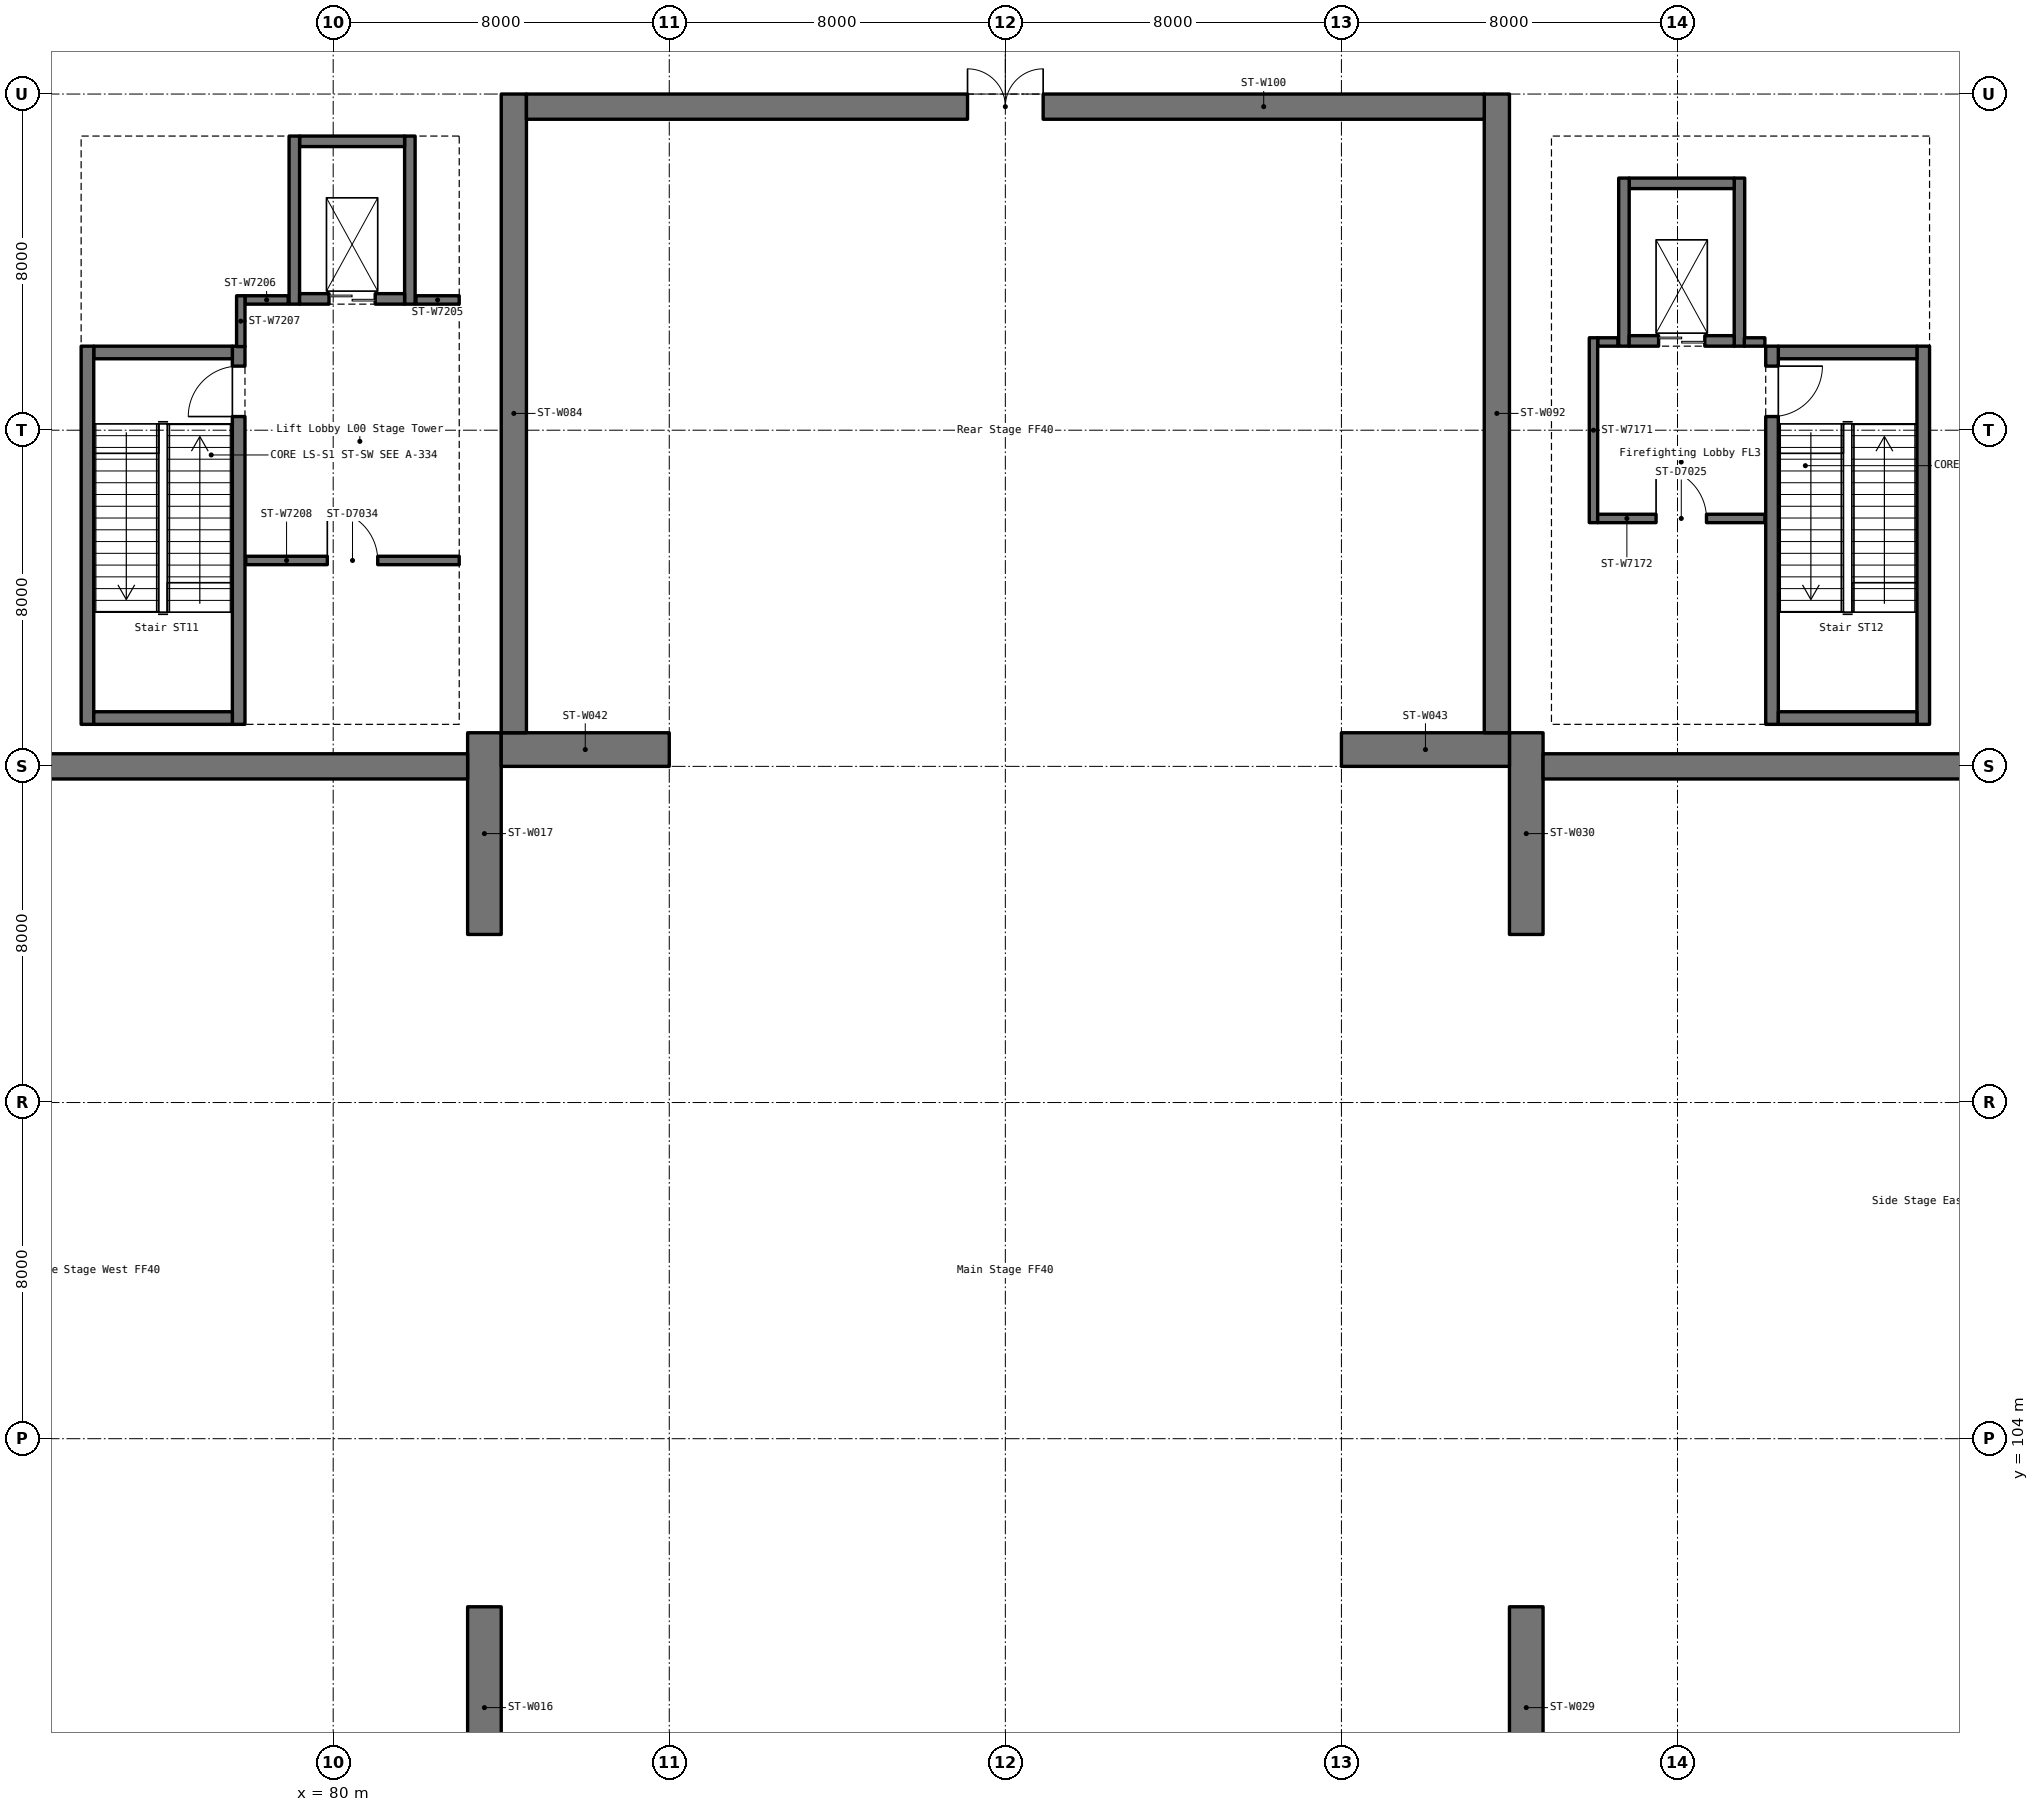
"""IFC4 building model, lengths in metres.
Left out: names, types, materials, properties, quantities, classifications, styles, units other than length and angle.
Written with IfcOpenShell. Run it as: python <this file> out.ifc"""

import sys

from ifc_helpers import new_model, si_unit, direction, frame, frame_2d, origin, place, context, subcontext, project, spatial, rectangle, extrude, element, fill, save


model = new_model("IFC4")
c1 = context("Model", 3, precision=1e-05, world=origin(), true_north=direction((0.0, 1.0)))
c2 = subcontext(c1, "Body", "Model", "MODEL_VIEW")
j1 = project(units=[si_unit("LENGTHUNIT", "METRE"), si_unit("PLANEANGLEUNIT", "RADIAN")], contexts=[c1])
p1 = place(None, origin())
s1 = spatial("IfcSite", under=j1, at=p1, CompositionType="ELEMENT")
p2 = place(p1, origin())
s2 = spatial("IfcBuilding", under=s1, at=p2, CompositionType="ELEMENT")
p3 = place(p2, origin())
s3 = spatial("IfcBuildingStorey", under=s2, at=p3, CompositionType="ELEMENT", Elevation=0.0)
for number, where, z_axis, x_axis in (
    (1, (83.6, 95.2, 0.0), (0.0, 0.0, 1.0), (0.0, 1.0, 0.0)),
    (2, (83.6, 116.0, 0.0), (0.0, 0.0, 1.0), (0.0, 1.0, 0.0)),
    (3, (108.4, 95.2, 0.0), (0.0, 0.0, 1.0), (0.0, 1.0, 0.0)),
    (4, (108.4, 116.0, 0.0), (0.0, 0.0, 1.0), (0.0, 1.0, 0.0)),
):
    element("IfcWall", number, at=place(p3, frame(where, z_axis=z_axis, x_axis=x_axis)), inside=s3, PredefinedType="SHEAR", context=c2, shape_type="SweptSolid", body=[
        extrude(rectangle(XDim=4.8, YDim=0.8, at=frame_2d((2.4, 0.0))), origin(), (0.0, 0.0, 1.0), 6.0),
    ])
for number, where, z_axis, x_axis in (
    (5, (84.0, 120.4, 0.0), (0.0, 0.0, 1.0), (1.0, 0.0, 0.0)),
    (6, (104.0, 120.4, 0.0), (0.0, 0.0, 1.0), (1.0, 0.0, 0.0)),
):
    element("IfcWall", number, at=place(p3, frame(where, z_axis=z_axis, x_axis=x_axis)), inside=s3, PredefinedType="SHEAR", context=c2, shape_type="SweptSolid", body=[
        extrude(rectangle(XDim=4.0, YDim=0.8, at=frame_2d((2.0, 0.0))), origin(), (0.0, 0.0, 1.0), 6.0),
    ])
for number, where, z_axis, x_axis in (
    (7, (60.6, 120.0, 0.0), (0.0, 0.0, 1.0), (1.0, 0.0, 0.0)),
    (8, (108.8, 120.0, 0.0), (0.0, 0.0, 1.0), (1.0, 0.0, 0.0)),
):
    element("IfcWall", number, at=place(p3, frame(where, z_axis=z_axis, x_axis=x_axis)), inside=s3, PredefinedType="SHEAR", context=c2, shape_type="SweptSolid", body=[
        extrude(rectangle(XDim=22.6, YDim=0.6, at=frame_2d((11.3, 0.0))), origin(), (0.0, 0.0, 1.0), 6.0),
    ])
for number, where, z_axis, x_axis in (
    (9, (84.3, 120.8, 0.0), (0.0, 0.0, 1.0), (0.0, 1.0, 0.0)),
    (10, (107.7, 120.8, 0.0), (0.0, 0.0, 1.0), (0.0, 1.0, 0.0)),
):
    element("IfcWall", number, at=place(p3, frame(where, z_axis=z_axis, x_axis=x_axis)), inside=s3, PredefinedType="SHEAR", context=c2, shape_type="SweptSolid", body=[
        extrude(rectangle(XDim=15.2, YDim=0.6, at=frame_2d((7.6, 0.0))), origin(), (0.0, 0.0, 1.0), 6.0),
    ])
p4 = place(p3, frame((84.6, 135.7, 0.0), z_axis=(0.0, 0.0, 1.0), x_axis=(1.0, 0.0, 0.0)))
e11 = element("IfcWall", 11, at=p4, inside=s3, PredefinedType="SHEAR", context=c2, shape_type="SweptSolid", body=[
    extrude(rectangle(XDim=22.8, YDim=0.6, at=frame_2d((11.4, 0.0))), origin(), (0.0, 0.0, 1.0), 6.0),
])
p5 = place(p4, frame((10.5, 0.0, 0.0)))
e12 = element("IfcOpeningElement", 12, at=p5, cuts=e11, PredefinedType="OPENING", context=c2, shape_type="SweptSolid", body=[
    extrude(rectangle(XDim=1.8, YDim=2.1, at=frame_2d((0.9, 1.05))), frame((0.0, 0.312, 0.0), z_axis=(0.0, -1.0, 0.0), x_axis=(1.0, 0.0, 0.0)), (0.0, 0.0, 1.0), 0.624),
])
p6 = place(p3, frame((77.75, 121.0, 0.0), z_axis=(0.0, 0.0, 1.0), x_axis=(0.0, 1.0, 0.0)))
e13 = element("IfcWall", 13, at=p6, inside=s3, PredefinedType="SOLIDWALL", context=c2, shape_type="SweptSolid", body=[
    extrude(rectangle(XDim=9.0, YDim=0.3, at=frame_2d((4.5, 0.0))), origin(), (0.0, 0.0, 1.0), 6.0),
])
p7 = place(p6, frame((7.325, 0.0, 0.0)))
e14 = element("IfcOpeningElement", 14, at=p7, cuts=e13, PredefinedType="OPENING", context=c2, shape_type="SweptSolid", body=[
    extrude(rectangle(XDim=1.2, YDim=2.1, at=frame_2d((0.6, 1.05))), frame((0.0, 0.162, 0.0), z_axis=(0.0, -1.0, 0.0), x_axis=(1.0, 0.0, 0.0)), (0.0, 0.0, 1.0), 0.324),
])
p8 = place(p3, frame((77.6, 129.85, 0.0), z_axis=(0.0, 0.0, 1.0), x_axis=(-1.0, 0.0, 0.0)))
e15 = element("IfcWall", 15, at=p8, inside=s3, PredefinedType="SOLIDWALL", context=c2, shape_type="SweptSolid", body=[
    extrude(rectangle(XDim=3.3, YDim=0.3, at=frame_2d((1.65, 0.0))), origin(), (0.0, 0.0, 1.0), 6.0),
])
p9 = place(p3, frame((74.15, 130.0, 0.0), z_axis=(0.0, 0.0, 1.0), x_axis=(0.0, -1.0, 0.0)))
e16 = element("IfcWall", 16, at=p9, inside=s3, PredefinedType="SOLIDWALL", context=c2, shape_type="SweptSolid", body=[
    extrude(rectangle(XDim=9.0, YDim=0.3, at=frame_2d((4.5, 0.0))), origin(), (0.0, 0.0, 1.0), 6.0),
])
p10 = place(p3, frame((74.3, 121.15, 0.0), z_axis=(0.0, 0.0, 1.0), x_axis=(1.0, 0.0, 0.0)))
e17 = element("IfcWall", 17, at=p10, inside=s3, PredefinedType="SOLIDWALL", context=c2, shape_type="SweptSolid", body=[
    extrude(rectangle(XDim=3.3, YDim=0.3, at=frame_2d((1.65, 0.0))), origin(), (0.0, 0.0, 1.0), 6.0),
])
p11 = place(p3, frame((117.85, 121.0, 0.0), z_axis=(0.0, 0.0, 1.0), x_axis=(0.0, 1.0, 0.0)))
e18 = element("IfcWall", 18, at=p11, inside=s3, PredefinedType="SOLIDWALL", context=c2, shape_type="SweptSolid", body=[
    extrude(rectangle(XDim=9.0, YDim=0.3, at=frame_2d((4.5, 0.0))), origin(), (0.0, 0.0, 1.0), 6.0),
])
p12 = place(p3, frame((117.7, 129.85, 0.0), z_axis=(0.0, 0.0, 1.0), x_axis=(-1.0, 0.0, 0.0)))
e19 = element("IfcWall", 19, at=p12, inside=s3, PredefinedType="SOLIDWALL", context=c2, shape_type="SweptSolid", body=[
    extrude(rectangle(XDim=3.3, YDim=0.3, at=frame_2d((1.65, 0.0))), origin(), (0.0, 0.0, 1.0), 6.0),
])
p13 = place(p3, frame((114.25, 130.0, 0.0), z_axis=(0.0, 0.0, 1.0), x_axis=(0.0, -1.0, 0.0)))
e20 = element("IfcWall", 20, at=p13, inside=s3, PredefinedType="SOLIDWALL", context=c2, shape_type="SweptSolid", body=[
    extrude(rectangle(XDim=9.0, YDim=0.3, at=frame_2d((4.5, 0.0))), origin(), (0.0, 0.0, 1.0), 6.0),
])
p14 = place(p13, frame((0.475, 0.0, 0.0)))
e21 = element("IfcOpeningElement", 21, at=p14, cuts=e20, PredefinedType="OPENING", context=c2, shape_type="SweptSolid", body=[
    extrude(rectangle(XDim=1.2, YDim=2.1, at=frame_2d((0.6, 1.05))), frame((0.0, 0.162, 0.0), z_axis=(0.0, -1.0, 0.0), x_axis=(1.0, 0.0, 0.0)), (0.0, 0.0, 1.0), 0.324),
])
p15 = place(p3, frame((114.4, 121.15, 0.0), z_axis=(0.0, 0.0, 1.0), x_axis=(1.0, 0.0, 0.0)))
e22 = element("IfcWall", 22, at=p15, inside=s3, PredefinedType="SOLIDWALL", context=c2, shape_type="SweptSolid", body=[
    extrude(rectangle(XDim=3.3, YDim=0.3, at=frame_2d((1.65, 0.0))), origin(), (0.0, 0.0, 1.0), 6.0),
])
p16 = place(p3, frame((113.475, 130.0, 0.0), z_axis=(0.0, 0.0, 1.0), x_axis=(0.0, 1.0, 0.0)))
e23 = element("IfcWall", 23, at=p16, inside=s3, PredefinedType="SOLIDWALL", context=c2, shape_type="SweptSolid", body=[
    extrude(rectangle(XDim=4.0, YDim=0.25, at=frame_2d((2.0, 0.0))), origin(), (0.0, 0.0, 1.0), 6.0),
])
p17 = place(p3, frame((113.35, 133.875, 0.0), z_axis=(0.0, 0.0, 1.0), x_axis=(-1.0, 0.0, 0.0)))
e24 = element("IfcWall", 24, at=p17, inside=s3, PredefinedType="SOLIDWALL", context=c2, shape_type="SweptSolid", body=[
    extrude(rectangle(XDim=2.5, YDim=0.25, at=frame_2d((1.25, 0.0))), origin(), (0.0, 0.0, 1.0), 6.0),
])
p18 = place(p3, frame((110.725, 134.0, 0.0), z_axis=(0.0, 0.0, 1.0), x_axis=(0.0, -1.0, 0.0)))
e25 = element("IfcWall", 25, at=p18, inside=s3, PredefinedType="SOLIDWALL", context=c2, shape_type="SweptSolid", body=[
    extrude(rectangle(XDim=4.0, YDim=0.25, at=frame_2d((2.0, 0.0))), origin(), (0.0, 0.0, 1.0), 6.0),
])
p19 = place(p3, frame((110.85, 130.125, 0.0), z_axis=(0.0, 0.0, 1.0), x_axis=(1.0, 0.0, 0.0)))
e26 = element("IfcWall", 26, at=p19, inside=s3, PredefinedType="SOLIDWALL", context=c2, shape_type="SweptSolid", body=[
    extrude(rectangle(XDim=2.5, YDim=0.25, at=frame_2d((1.25, 0.0))), origin(), (0.0, 0.0, 1.0), 6.0),
])
p20 = place(p19, frame((0.7, 0.0, 0.0)))
e27 = element("IfcOpeningElement", 27, at=p20, cuts=e26, PredefinedType="OPENING", context=c2, shape_type="SweptSolid", body=[
    extrude(rectangle(XDim=1.1, YDim=2.1, at=frame_2d((0.55, 1.05))), frame((0.0, 0.137, 0.0), z_axis=(0.0, -1.0, 0.0), x_axis=(1.0, 0.0, 0.0)), (0.0, 0.0, 1.0), 0.274),
])
p21 = place(p3, frame((81.825, 131.0, 0.0), z_axis=(0.0, 0.0, 1.0), x_axis=(0.0, 1.0, 0.0)))
e28 = element("IfcWall", 28, at=p21, inside=s3, PredefinedType="SOLIDWALL", context=c2, shape_type="SweptSolid", body=[
    extrude(rectangle(XDim=4.0, YDim=0.25, at=frame_2d((2.0, 0.0))), origin(), (0.0, 0.0, 1.0), 6.0),
])
p22 = place(p3, frame((81.7, 134.875, 0.0), z_axis=(0.0, 0.0, 1.0), x_axis=(-1.0, 0.0, 0.0)))
e29 = element("IfcWall", 29, at=p22, inside=s3, PredefinedType="SOLIDWALL", context=c2, shape_type="SweptSolid", body=[
    extrude(rectangle(XDim=2.5, YDim=0.25, at=frame_2d((1.25, 0.0))), origin(), (0.0, 0.0, 1.0), 6.0),
])
p23 = place(p3, frame((79.075, 135.0, 0.0), z_axis=(0.0, 0.0, 1.0), x_axis=(0.0, -1.0, 0.0)))
e30 = element("IfcWall", 30, at=p23, inside=s3, PredefinedType="SOLIDWALL", context=c2, shape_type="SweptSolid", body=[
    extrude(rectangle(XDim=4.0, YDim=0.25, at=frame_2d((2.0, 0.0))), origin(), (0.0, 0.0, 1.0), 6.0),
])
p24 = place(p3, frame((79.2, 131.125, 0.0), z_axis=(0.0, 0.0, 1.0), x_axis=(1.0, 0.0, 0.0)))
e31 = element("IfcWall", 31, at=p24, inside=s3, PredefinedType="SOLIDWALL", context=c2, shape_type="SweptSolid", body=[
    extrude(rectangle(XDim=2.5, YDim=0.25, at=frame_2d((1.25, 0.0))), origin(), (0.0, 0.0, 1.0), 6.0),
])
p25 = place(p24, frame((0.7, 0.0, 0.0)))
e32 = element("IfcOpeningElement", 32, at=p25, cuts=e31, PredefinedType="OPENING", context=c2, shape_type="SweptSolid", body=[
    extrude(rectangle(XDim=1.1, YDim=2.1, at=frame_2d((0.55, 1.05))), frame((0.0, 0.137, 0.0), z_axis=(0.0, -1.0, 0.0), x_axis=(1.0, 0.0, 0.0)), (0.0, 0.0, 1.0), 0.274),
])
p26 = place(p3, frame((114.08, 130.1, 0.0), z_axis=(0.0, 0.0, 1.0), x_axis=(-1.0, 0.0, 0.0)))
e33 = element("IfcWall", 33, at=p26, inside=s3, PredefinedType="PARTITIONING", context=c2, shape_type="SweptSolid", body=[
    extrude(rectangle(XDim=0.49, YDim=0.2, at=frame_2d((0.245, 0.0))), origin(), (0.0, 0.0, 1.0), 5.78),
])
p27 = place(p3, frame((110.58, 130.1, 0.0), z_axis=(0.0, 0.0, 1.0), x_axis=(-1.0, 0.0, 0.0)))
e34 = element("IfcWall", 34, at=p27, inside=s3, PredefinedType="PARTITIONING", context=c2, shape_type="SweptSolid", body=[
    extrude(rectangle(XDim=0.48, YDim=0.2, at=frame_2d((0.24, 0.0))), origin(), (0.0, 0.0, 1.0), 5.78),
])
p28 = place(p3, frame((110.0, 130.2, 0.0), z_axis=(0.0, 0.0, 1.0), x_axis=(0.0, -1.0, 0.0)))
e35 = element("IfcWall", 35, at=p28, inside=s3, PredefinedType="PARTITIONING", context=c2, shape_type="SweptSolid", body=[
    extrude(rectangle(XDim=4.4, YDim=0.2, at=frame_2d((2.2, 0.0))), origin(), (0.0, 0.0, 1.0), 5.78),
])
p29 = place(p3, frame((110.1, 125.9, 0.0), z_axis=(0.0, 0.0, 1.0), x_axis=(1.0, 0.0, 0.0)))
e36 = element("IfcWall", 36, at=p29, inside=s3, PredefinedType="PARTITIONING", context=c2, shape_type="SweptSolid", body=[
    extrude(rectangle(XDim=3.98, YDim=0.2, at=frame_2d((1.99, 0.0))), origin(), (0.0, 0.0, 1.0), 5.78),
])
p30 = place(p29, frame((1.39, 0.0, 0.0)))
e37 = element("IfcOpeningElement", 37, at=p30, cuts=e36, PredefinedType="OPENING", context=c2, shape_type="SweptSolid", body=[
    extrude(rectangle(XDim=1.2, YDim=2.1, at=frame_2d((0.6, 1.05))), frame((0.0, 0.112, 0.0), z_axis=(0.0, -1.0, 0.0), x_axis=(1.0, 0.0, 0.0)), (0.0, 0.0, 1.0), 0.224),
])
for number, where, z_axis, x_axis in (
    (38, (83.0, 131.1, 0.0), (0.0, 0.0, 1.0), (-1.0, 0.0, 0.0)),
    (39, (78.93, 131.1, 0.0), (0.0, 0.0, 1.0), (-1.0, 0.0, 0.0)),
):
    element("IfcWall", number, at=place(p3, frame(where, z_axis=z_axis, x_axis=x_axis)), inside=s3, PredefinedType="PARTITIONING", context=c2, shape_type="SweptSolid", body=[
        extrude(rectangle(XDim=1.03, YDim=0.2, at=frame_2d((0.515, 0.0))), origin(), (0.0, 0.0, 1.0), 5.78),
    ])
p31 = place(p3, frame((77.8, 131.2, 0.0), z_axis=(0.0, 0.0, 1.0), x_axis=(0.0, -1.0, 0.0)))
e40 = element("IfcWall", 40, at=p31, inside=s3, PredefinedType="PARTITIONING", context=c2, shape_type="SweptSolid", body=[
    extrude(rectangle(XDim=1.21, YDim=0.2, at=frame_2d((0.605, 0.0))), origin(), (0.0, 0.0, 1.0), 5.78),
])
p32 = place(p3, frame((77.92, 124.9, 0.0), z_axis=(0.0, 0.0, 1.0), x_axis=(1.0, 0.0, 0.0)))
e41 = element("IfcWall", 41, at=p32, inside=s3, PredefinedType="PARTITIONING", context=c2, shape_type="SweptSolid", body=[
    extrude(rectangle(XDim=5.08, YDim=0.2, at=frame_2d((2.54, 0.0))), origin(), (0.0, 0.0, 1.0), 5.78),
])
p33 = place(p32, frame((1.94, 0.0, 0.0)))
e42 = element("IfcOpeningElement", 42, at=p33, cuts=e41, PredefinedType="OPENING", context=c2, shape_type="SweptSolid", body=[
    extrude(rectangle(XDim=1.2, YDim=2.1, at=frame_2d((0.6, 1.05))), frame((0.0, 0.112, 0.0), z_axis=(0.0, -1.0, 0.0), x_axis=(1.0, 0.0, 0.0)), (0.0, 0.0, 1.0), 0.224),
])
p34 = place(p5, origin())
e43 = element("IfcDoor", 43, at=p34, inside=s3, OperationType="DOUBLE_DOOR_DOUBLE_SWING", PredefinedType="DOOR", context=c2, shape_type="SweptSolid", body=[
    extrude(rectangle(XDim=1.8, YDim=2.1, at=frame_2d((0.9, 1.05))), frame((0.0, 0.025, 0.0), z_axis=(0.0, -1.0, 0.0), x_axis=(1.0, 0.0, 0.0)), (0.0, 0.0, 1.0), 0.05),
])
fill(e12, e43)
p35 = place(p7, origin())
e44 = element("IfcDoor", 44, at=p35, inside=s3, OperationType="SINGLE_SWING_LEFT", PredefinedType="DOOR", context=c2, shape_type="SweptSolid", body=[
    extrude(rectangle(XDim=1.2, YDim=2.1, at=frame_2d((0.6, 1.05))), frame((0.0, 0.025, 0.0), z_axis=(0.0, -1.0, 0.0), x_axis=(1.0, 0.0, 0.0)), (0.0, 0.0, 1.0), 0.05),
])
fill(e14, e44)
p36 = place(p14, origin())
e45 = element("IfcDoor", 45, at=p36, inside=s3, OperationType="SINGLE_SWING_LEFT", PredefinedType="DOOR", context=c2, shape_type="SweptSolid", body=[
    extrude(rectangle(XDim=1.2, YDim=2.1, at=frame_2d((0.6, 1.05))), frame((0.0, 0.025, 0.0), z_axis=(0.0, -1.0, 0.0), x_axis=(1.0, 0.0, 0.0)), (0.0, 0.0, 1.0), 0.05),
])
fill(e21, e45)
p37 = place(p20, origin())
e46 = element("IfcDoor", 46, at=p37, inside=s3, OperationType="DOUBLE_DOOR_SLIDING", PredefinedType="DOOR", context=c2, shape_type="SweptSolid", body=[
    extrude(rectangle(XDim=1.1, YDim=2.1, at=frame_2d((0.55, 1.05))), frame((0.0, 0.025, 0.0), z_axis=(0.0, -1.0, 0.0), x_axis=(1.0, 0.0, 0.0)), (0.0, 0.0, 1.0), 0.05),
])
fill(e27, e46)
p38 = place(p25, origin())
e47 = element("IfcDoor", 47, at=p38, inside=s3, OperationType="DOUBLE_DOOR_SLIDING", PredefinedType="DOOR", context=c2, shape_type="SweptSolid", body=[
    extrude(rectangle(XDim=1.1, YDim=2.1, at=frame_2d((0.55, 1.05))), frame((0.0, 0.025, 0.0), z_axis=(0.0, -1.0, 0.0), x_axis=(1.0, 0.0, 0.0)), (0.0, 0.0, 1.0), 0.05),
])
fill(e32, e47)
p39 = place(p30, origin())
e48 = element("IfcDoor", 48, at=p39, inside=s3, OperationType="SINGLE_SWING_LEFT", PredefinedType="DOOR", context=c2, shape_type="SweptSolid", body=[
    extrude(rectangle(XDim=1.2, YDim=2.1, at=frame_2d((0.6, 1.05))), frame((0.0, 0.025, 0.0), z_axis=(0.0, -1.0, 0.0), x_axis=(1.0, 0.0, 0.0)), (0.0, 0.0, 1.0), 0.05),
])
fill(e37, e48)
p40 = place(p33, origin())
e49 = element("IfcDoor", 49, at=p40, inside=s3, OperationType="SINGLE_SWING_LEFT", PredefinedType="DOOR", context=c2, shape_type="SweptSolid", body=[
    extrude(rectangle(XDim=1.2, YDim=2.1, at=frame_2d((0.6, 1.05))), frame((0.0, 0.025, 0.0), z_axis=(0.0, -1.0, 0.0), x_axis=(1.0, 0.0, 0.0)), (0.0, 0.0, 1.0), 0.05),
])
fill(e42, e49)
save(model, sys.argv[1])
